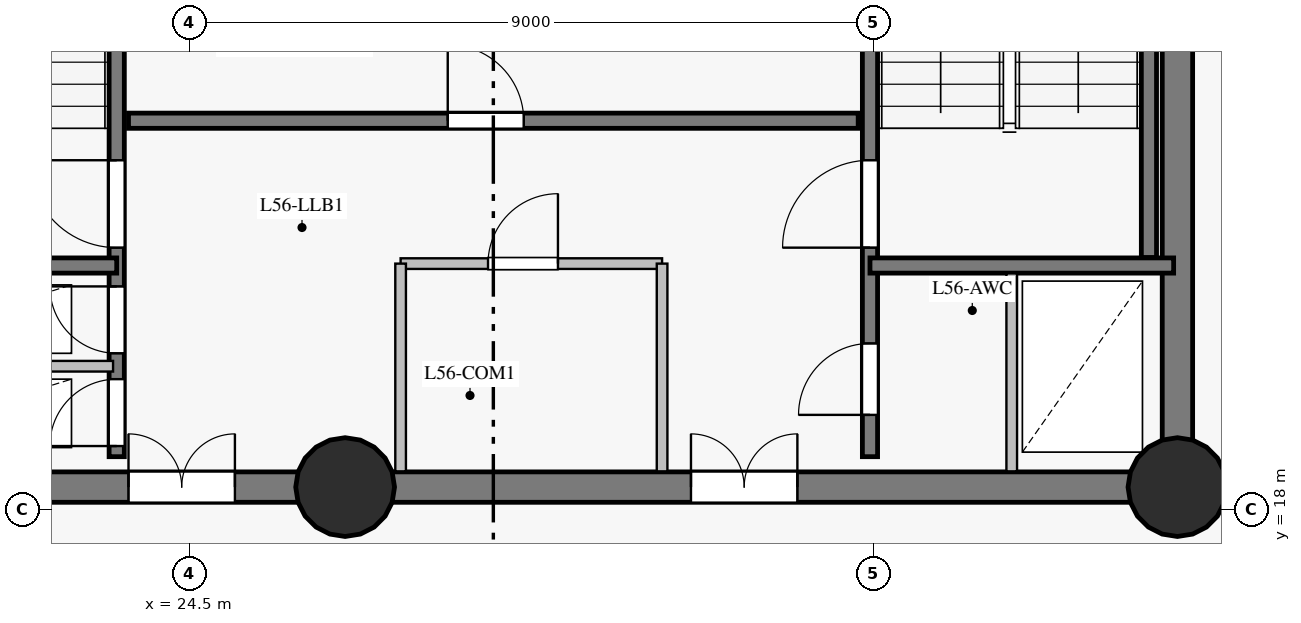
"""IFC4 building model, lengths in metres.
Left out: names, types, materials, properties, quantities, classifications, styles, units other than length and angle.
Written with IfcOpenShell. Run it as: python <this file> out.ifc"""

import sys

from ifc_helpers import new_model, si_unit, direction, frame, frame_2d, origin, origin_with_axes, origin_2d, place, context, subcontext, project, spatial, rectangle, circle, extrude, source, transform, mapped, element, fill, save


model = new_model("IFC4")
c1 = context("Model", 3, precision=1e-05, world=origin(), true_north=direction((0.0, 1.0)))
c2 = subcontext(c1, "Body", "Model", "MODEL_VIEW")
j1 = project(units=[si_unit("LENGTHUNIT", "METRE"), si_unit("PLANEANGLEUNIT", "RADIAN")], contexts=[c1])
p1 = place(None, origin())
s1 = spatial("IfcSite", under=j1, at=p1, CompositionType="ELEMENT")
p2 = place(p1, origin())
s2 = spatial("IfcBuilding", under=s1, at=p2, CompositionType="ELEMENT")
p3 = place(p2, frame((0.0, 0.0, 193.15)))
s3 = spatial("IfcBuildingStorey", under=s2, at=p3, CompositionType="ELEMENT", Elevation=193.15)
p4 = place(p3, frame((19.5, 18.3, 0.0), z_axis=(0.0, 0.0, 1.0), x_axis=(1.0, 0.0, 0.0)))
e1 = element("IfcWall", 1, at=p4, inside=s3, PredefinedType="SHEAR", context=c2, shape_type="SweptSolid", body=[
    extrude(rectangle(XDim=7.05, YDim=0.4, at=frame_2d((3.525, 0.0))), origin(), (0.0, 0.0, 1.0), 2.825),
])
p5 = place(p4, frame((4.2, 0.0, 0.0)))
e2 = element("IfcOpeningElement", 2, at=p5, cuts=e1, PredefinedType="OPENING", context=c2, shape_type="SweptSolid", body=[
    extrude(rectangle(XDim=1.4, YDim=2.2, at=frame_2d((0.7, 1.1))), frame((0.0, 0.21, 0.0), z_axis=(0.0, -1.0, 0.0), x_axis=(1.0, 0.0, 0.0)), (0.0, 0.0, 1.0), 0.42),
])
p6 = place(p3, frame((26.55, 18.3, 0.0), z_axis=(0.0, 0.0, 1.0), x_axis=(1.0, 0.0, 0.0)))
e3 = element("IfcWall", 3, at=p6, inside=s3, PredefinedType="SHEAR", context=c2, shape_type="SweptSolid", body=[
    extrude(rectangle(XDim=10.95, YDim=0.4, at=frame_2d((5.475, 0.0))), origin(), (0.0, 0.0, 1.0), 2.825),
])
p7 = place(p6, frame((4.55, 0.0, 0.0)))
e4 = element("IfcOpeningElement", 4, at=p7, cuts=e3, PredefinedType="OPENING", context=c2, shape_type="SweptSolid", body=[
    extrude(rectangle(XDim=1.4, YDim=2.2, at=frame_2d((0.7, 1.1))), frame((0.0, 0.21, 0.0), z_axis=(0.0, -1.0, 0.0), x_axis=(1.0, 0.0, 0.0)), (0.0, 0.0, 1.0), 0.42),
])
p8 = place(p3, frame((37.5, 18.3, 0.0), z_axis=(0.0, 0.0, 1.0), x_axis=(0.0, 1.0, 0.0)))
e5 = element("IfcWall", 5, at=p8, inside=s3, PredefinedType="SHEAR", context=c2, shape_type="SweptSolid", body=[
    extrude(rectangle(XDim=16.4, YDim=0.4, at=frame_2d((8.2, 0.0))), origin(), (0.0, 0.0, 1.0), 2.825),
])
p9 = place(p8, frame((13.85, 0.0, 0.0)))
e6 = element("IfcOpeningElement", 6, at=p9, cuts=e5, PredefinedType="OPENING", context=c2, shape_type="SweptSolid", body=[
    extrude(rectangle(XDim=1.2, YDim=2.15, at=frame_2d((0.6, 1.075))), frame((0.0, 0.21, 0.0), z_axis=(0.0, -1.0, 0.0), x_axis=(1.0, 0.0, 0.0)), (0.0, 0.0, 1.0), 0.42),
])
m1 = source(origin_with_axes(), c2, "Body", "SweptSolid", [
    extrude(circle(Radius=0.65, at=origin_2d()), origin(), (0.0, 0.0, 1.0), 3.05),
])
for number, where, z_axis, x_axis in (
    (7, (26.55, 18.3, 0.0), (0.0, 0.0, 1.0), (1.0, 0.0, 0.0)),
    (8, (37.5, 18.3, 0.0), (0.0, 0.0, 1.0), (1.0, 0.0, 0.0)),
):
    element("IfcColumn", number, at=place(p3, frame(where, z_axis=z_axis, x_axis=x_axis)), inside=s3, PredefinedType="COLUMN", context=c2, shape_type="MappedRepresentation", body=[
        mapped(m1, transform((0.0, 0.0, 0.0), scale=1.0)),
    ])
p10 = place(p3, frame((23.545, 18.7, 0.0), z_axis=(0.0, 0.0, 1.0), x_axis=(0.0, 1.0, 0.0)))
e9 = element("IfcWall", 9, at=p10, inside=s3, PredefinedType="SHEAR", context=c2, shape_type="SweptSolid", body=[
    extrude(rectangle(XDim=15.6, YDim=0.2, at=frame_2d((7.8, 0.0))), origin(), (0.0, 0.0, 1.0), 2.825),
])
p11 = place(p10, frame((2.75, 0.0, 0.0)))
e10 = element("IfcOpeningElement", 10, at=p11, cuts=e9, PredefinedType="OPENING", context=c2, shape_type="SweptSolid", body=[
    extrude(rectangle(XDim=1.15, YDim=2.15, at=frame_2d((0.575, 1.075))), frame((0.0, 0.11, 0.0), z_axis=(0.0, -1.0, 0.0), x_axis=(1.0, 0.0, 0.0)), (0.0, 0.0, 1.0), 0.22),
])
p12 = place(p10, frame((0.14, 0.0, 0.0)))
e11 = element("IfcOpeningElement", 11, at=p12, cuts=e9, PredefinedType="OPENING", context=c2, shape_type="SweptSolid", body=[
    extrude(rectangle(XDim=0.88, YDim=2.1, at=frame_2d((0.44, 1.05))), frame((0.0, 0.11, 0.0), z_axis=(0.0, -1.0, 0.0), x_axis=(1.0, 0.0, 0.0)), (0.0, 0.0, 1.0), 0.22),
])
p13 = place(p10, frame((1.36, 0.0, 0.0)))
e12 = element("IfcOpeningElement", 12, at=p13, cuts=e9, PredefinedType="OPENING", context=c2, shape_type="SweptSolid", body=[
    extrude(rectangle(XDim=0.88, YDim=2.1, at=frame_2d((0.44, 1.05))), frame((0.0, 0.11, 0.0), z_axis=(0.0, -1.0, 0.0), x_axis=(1.0, 0.0, 0.0)), (0.0, 0.0, 1.0), 0.22),
])
p14 = place(p10, frame((12.1, 0.0, 0.0)))
e13 = element("IfcOpeningElement", 13, at=p14, cuts=e9, PredefinedType="OPENING", context=c2, shape_type="SweptSolid", body=[
    extrude(rectangle(XDim=1.12, YDim=2.15, at=frame_2d((0.56, 1.075))), frame((0.0, 0.11, 0.0), z_axis=(0.0, -1.0, 0.0), x_axis=(1.0, 0.0, 0.0)), (0.0, 0.0, 1.0), 0.22),
])
p15 = place(p10, frame((14.05, 0.0, 0.0)))
e14 = element("IfcOpeningElement", 14, at=p15, cuts=e9, PredefinedType="OPENING", context=c2, shape_type="SweptSolid", body=[
    extrude(rectangle(XDim=1.12, YDim=2.15, at=frame_2d((0.56, 1.075))), frame((0.0, 0.11, 0.0), z_axis=(0.0, -1.0, 0.0), x_axis=(1.0, 0.0, 0.0)), (0.0, 0.0, 1.0), 0.22),
])
p16 = place(p3, frame((33.455, 18.7, 0.0), z_axis=(0.0, 0.0, 1.0), x_axis=(0.0, 1.0, 0.0)))
e15 = element("IfcWall", 15, at=p16, inside=s3, PredefinedType="SHEAR", context=c2, shape_type="SweptSolid", body=[
    extrude(rectangle(XDim=15.6, YDim=0.2, at=frame_2d((7.8, 0.0))), origin(), (0.0, 0.0, 1.0), 2.825),
])
p17 = place(p16, frame((2.75, 0.0, 0.0)))
e16 = element("IfcOpeningElement", 16, at=p17, cuts=e15, PredefinedType="OPENING", context=c2, shape_type="SweptSolid", body=[
    extrude(rectangle(XDim=1.15, YDim=2.15, at=frame_2d((0.575, 1.075))), frame((0.0, 0.11, 0.0), z_axis=(0.0, -1.0, 0.0), x_axis=(1.0, 0.0, 0.0)), (0.0, 0.0, 1.0), 0.22),
])
p18 = place(p16, frame((0.55, 0.0, 0.0)))
e17 = element("IfcOpeningElement", 17, at=p18, cuts=e15, PredefinedType="OPENING", context=c2, shape_type="SweptSolid", body=[
    extrude(rectangle(XDim=0.94, YDim=2.1, at=frame_2d((0.47, 1.05))), frame((0.0, 0.11, 0.0), z_axis=(0.0, -1.0, 0.0), x_axis=(1.0, 0.0, 0.0)), (0.0, 0.0, 1.0), 0.22),
])
p19 = place(p3, frame((23.7, 23.12, 0.0), z_axis=(0.0, 0.0, 1.0), x_axis=(1.0, 0.0, 0.0)))
e18 = element("IfcWall", 18, at=p19, inside=s3, PredefinedType="SHEAR", context=c2, shape_type="SweptSolid", body=[
    extrude(rectangle(XDim=9.6, YDim=0.2, at=frame_2d((4.8, 0.0))), origin(), (0.0, 0.0, 1.0), 2.825),
])
p20 = place(p19, frame((4.2, 0.0, 0.0)))
e19 = element("IfcOpeningElement", 19, at=p20, cuts=e18, PredefinedType="OPENING", context=c2, shape_type="SweptSolid", body=[
    extrude(rectangle(XDim=1.0, YDim=2.15, at=frame_2d((0.5, 1.075))), frame((0.0, 0.11, 0.0), z_axis=(0.0, -1.0, 0.0), x_axis=(1.0, 0.0, 0.0)), (0.0, 0.0, 1.0), 0.22),
])
p21 = place(p3, frame((37.125, 21.32, 0.0), z_axis=(0.0, 0.0, 1.0), x_axis=(0.0, 1.0, 0.0)))
e20 = element("IfcWall", 20, at=p21, inside=s3, PredefinedType="SHEAR", context=c2, shape_type="SweptSolid", body=[
    extrude(rectangle(XDim=7.5, YDim=0.2, at=frame_2d((3.75, 0.0))), origin(), (0.0, 0.0, 1.0), 2.825),
])
for number, where, z_axis, x_axis in (
    (21, (33.455, 21.215, 0.0), (0.0, 0.0, 1.0), (1.0, 0.0, 0.0)),
    (22, (19.55, 21.215, 0.0), (0.0, 0.0, 1.0), (1.0, 0.0, 0.0)),
):
    element("IfcWall", number, at=place(p3, frame(where, z_axis=z_axis, x_axis=x_axis)), inside=s3, PredefinedType="SHEAR", context=c2, shape_type="SweptSolid", body=[
        extrude(rectangle(XDim=3.995, YDim=0.2, at=frame_2d((1.998, 0.0))), origin(), (0.0, 0.0, 1.0), 2.825),
    ])
p22 = place(p3, frame((19.707, 19.89, 0.0), z_axis=(0.0, 0.0, 1.0), x_axis=(1.0, 0.0, 0.0)))
e23 = element("IfcWall", 23, at=p22, inside=s3, PredefinedType="PARTITIONING", context=c2, shape_type="SweptSolid", body=[
    extrude(rectangle(XDim=3.79, YDim=0.14, at=frame_2d((1.895, 0.0))), origin(), (0.0, 0.0, 1.0), 2.825),
])
p23 = place(p3, frame((27.28, 21.24, 0.0), z_axis=(0.0, 0.0, 1.0), x_axis=(1.0, 0.0, 0.0)))
e24 = element("IfcWall", 24, at=p23, inside=s3, PredefinedType="PARTITIONING", context=c2, shape_type="SweptSolid", body=[
    extrude(rectangle(XDim=3.44, YDim=0.14, at=frame_2d((1.72, 0.0))), origin(), (0.0, 0.0, 1.0), 2.825),
])
p24 = place(p23, frame((1.15, 0.0, 0.0)))
e25 = element("IfcOpeningElement", 25, at=p24, cuts=e24, PredefinedType="OPENING", context=c2, shape_type="SweptSolid", body=[
    extrude(rectangle(XDim=0.92, YDim=2.1, at=frame_2d((0.46, 1.05))), frame((0.0, 0.08, 0.0), z_axis=(0.0, -1.0, 0.0), x_axis=(1.0, 0.0, 0.0)), (0.0, 0.0, 1.0), 0.16),
])
for number, where, z_axis, x_axis in (
    (26, (27.28, 18.507, 0.0), (0.0, 0.0, 1.0), (0.0, 1.0, 0.0)),
    (27, (30.72, 18.507, 0.0), (0.0, 0.0, 1.0), (0.0, 1.0, 0.0)),
):
    element("IfcWall", number, at=place(p3, frame(where, z_axis=z_axis, x_axis=x_axis)), inside=s3, PredefinedType="PARTITIONING", context=c2, shape_type="SweptSolid", body=[
        extrude(rectangle(XDim=2.733, YDim=0.14, at=frame_2d((1.366, 0.0))), origin(), (0.0, 0.0, 1.0), 2.825),
    ])
p25 = place(p3, frame((35.32, 18.507, 0.0), z_axis=(0.0, 0.0, 1.0), x_axis=(0.0, 1.0, 0.0)))
e28 = element("IfcWall", 28, at=p25, inside=s3, PredefinedType="PARTITIONING", context=c2, shape_type="SweptSolid", body=[
    extrude(rectangle(XDim=2.604, YDim=0.14, at=frame_2d((1.302, 0.0))), origin(), (0.0, 0.0, 1.0), 2.825),
])
m2 = source(origin_with_axes(), c2, "Body", "SweptSolid", [
    extrude(rectangle(XDim=1.15, YDim=2.15, at=frame_2d((0.575, 1.075))), frame((0.0, 0.025, 0.0), z_axis=(0.0, -1.0, 0.0), x_axis=(1.0, 0.0, 0.0)), (0.0, 0.0, 1.0), 0.05),
])
p26 = place(p11, origin())
e29 = element("IfcDoor", 29, at=p26, inside=s3, OperationType="SINGLE_SWING_RIGHT", PredefinedType="DOOR", context=c2, shape_type="MappedRepresentation", body=[
    mapped(m2, transform((0.0, 0.0, 0.0), scale=1.0)),
])
fill(e10, e29)
p27 = place(p17, origin())
e30 = element("IfcDoor", 30, at=p27, inside=s3, OperationType="SINGLE_SWING_LEFT", PredefinedType="DOOR", context=c2, shape_type="MappedRepresentation", body=[
    mapped(m2, transform((0.0, 0.0, 0.0), scale=1.0)),
])
fill(e16, e30)
m3 = source(origin_with_axes(), c2, "Body", "SweptSolid", [
    extrude(rectangle(XDim=0.88, YDim=2.1, at=frame_2d((0.44, 1.05))), frame((0.0, 0.025, 0.0), z_axis=(0.0, -1.0, 0.0), x_axis=(1.0, 0.0, 0.0)), (0.0, 0.0, 1.0), 0.05),
])
p28 = place(p12, origin())
e31 = element("IfcDoor", 31, at=p28, inside=s3, OperationType="SINGLE_SWING_LEFT", PredefinedType="DOOR", context=c2, shape_type="MappedRepresentation", body=[
    mapped(m3, transform((0.0, 0.0, 0.0), scale=1.0)),
])
fill(e11, e31)
p29 = place(p13, origin())
e32 = element("IfcDoor", 32, at=p29, inside=s3, OperationType="SINGLE_SWING_RIGHT", PredefinedType="DOOR", context=c2, shape_type="MappedRepresentation", body=[
    mapped(m3, transform((0.0, 0.0, 0.0), scale=1.0)),
])
fill(e12, e32)
m4 = source(origin_with_axes(), c2, "Body", "SweptSolid", [
    extrude(rectangle(XDim=1.4, YDim=2.2, at=frame_2d((0.7, 1.1))), frame((0.0, 0.025, 0.0), z_axis=(0.0, -1.0, 0.0), x_axis=(1.0, 0.0, 0.0)), (0.0, 0.0, 1.0), 0.05),
])
p30 = place(p5, origin())
e33 = element("IfcDoor", 33, at=p30, inside=s3, OperationType="DOUBLE_DOOR_SINGLE_SWING", PredefinedType="DOOR", context=c2, shape_type="MappedRepresentation", body=[
    mapped(m4, transform((0.0, 0.0, 0.0), scale=1.0)),
])
fill(e2, e33)
p31 = place(p7, origin())
e34 = element("IfcDoor", 34, at=p31, inside=s3, OperationType="DOUBLE_DOOR_SINGLE_SWING", PredefinedType="DOOR", context=c2, shape_type="MappedRepresentation", body=[
    mapped(m4, transform((0.0, 0.0, 0.0), scale=1.0)),
])
fill(e4, e34)
m5 = source(origin_with_axes(), c2, "Body", "SweptSolid", [
    extrude(rectangle(XDim=0.94, YDim=2.1, at=frame_2d((0.47, 1.05))), frame((0.0, 0.025, 0.0), z_axis=(0.0, -1.0, 0.0), x_axis=(1.0, 0.0, 0.0)), (0.0, 0.0, 1.0), 0.05),
])
p32 = place(p18, origin())
e35 = element("IfcDoor", 35, at=p32, inside=s3, OperationType="SINGLE_SWING_LEFT", PredefinedType="DOOR", context=c2, shape_type="MappedRepresentation", body=[
    mapped(m5, transform((0.0, 0.0, 0.0), scale=1.0)),
])
fill(e17, e35)
m6 = source(origin_with_axes(), c2, "Body", "SweptSolid", [
    extrude(rectangle(XDim=0.92, YDim=2.1, at=frame_2d((0.46, 1.05))), frame((0.0, 0.025, 0.0), z_axis=(0.0, -1.0, 0.0), x_axis=(1.0, 0.0, 0.0)), (0.0, 0.0, 1.0), 0.05),
])
p33 = place(p24, origin())
e36 = element("IfcDoor", 36, at=p33, inside=s3, OperationType="SINGLE_SWING_RIGHT", PredefinedType="DOOR", context=c2, shape_type="MappedRepresentation", body=[
    mapped(m6, transform((0.0, 0.0, 0.0), scale=1.0)),
])
fill(e25, e36)
m7 = source(origin_with_axes(), c2, "Body", "SweptSolid", [
    extrude(rectangle(XDim=1.0, YDim=2.15, at=frame_2d((0.5, 1.075))), frame((0.0, 0.025, 0.0), z_axis=(0.0, -1.0, 0.0), x_axis=(1.0, 0.0, 0.0)), (0.0, 0.0, 1.0), 0.05),
])
p34 = place(p20, origin())
e37 = element("IfcDoor", 37, at=p34, inside=s3, OperationType="SINGLE_SWING_LEFT", PredefinedType="DOOR", context=c2, shape_type="MappedRepresentation", body=[
    mapped(m7, transform((0.0, 0.0, 0.0), scale=1.0)),
])
fill(e19, e37)
save(model, sys.argv[1])
